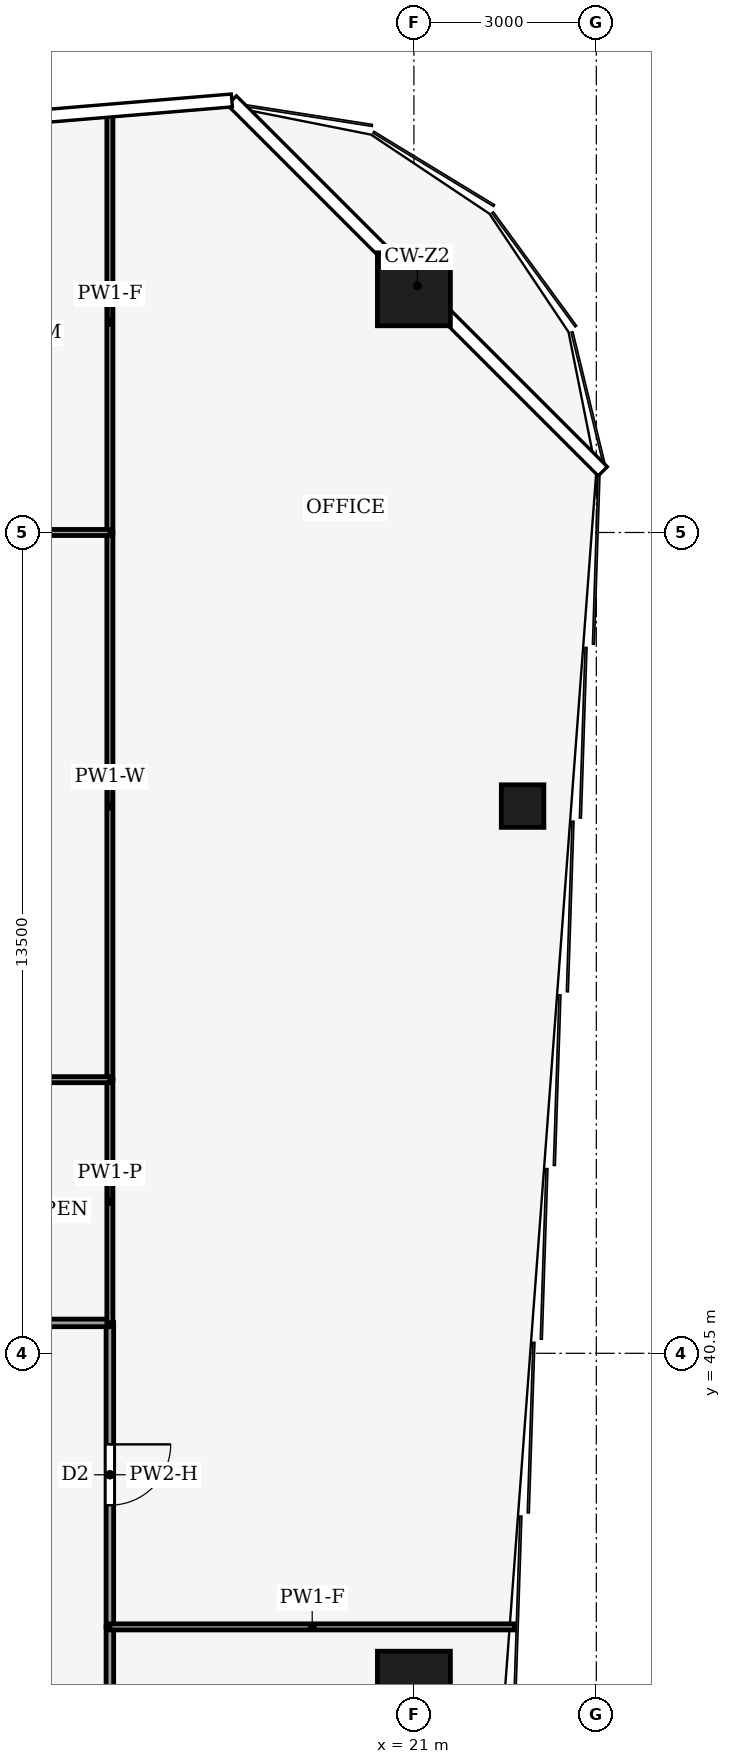
"""IFC4 building model, lengths in metres.
Left out: names, types, materials, properties, quantities, classifications, styles, units other than length and angle.
Written with IfcOpenShell. Run it as: python <this file> out.ifc"""

import sys

from ifc_helpers import new_model, si_unit, direction, frame, frame_2d, origin, origin_2d, place, context, subcontext, project, spatial, rectangle, hollow_rectangle, extrude, element, fill, save


model = new_model("IFC4")
c1 = context("Model", 3, precision=1e-05, world=origin(), true_north=direction((0.0, 1.0)))
c2 = subcontext(c1, "Body", "Model", "MODEL_VIEW")
j1 = project(units=[si_unit("LENGTHUNIT", "METRE"), si_unit("PLANEANGLEUNIT", "RADIAN")], contexts=[c1])
p1 = place(None, origin())
s1 = spatial("IfcSite", under=j1, at=p1, CompositionType="ELEMENT")
p2 = place(p1, origin())
s2 = spatial("IfcBuilding", under=s1, at=p2, CompositionType="ELEMENT")
p3 = place(p2, frame((0.0, 0.0, 134.0)))
s3 = spatial("IfcBuildingStorey", under=s2, at=p3, CompositionType="ELEMENT", Elevation=134.0)
for number, where, z_axis, x_axis in (
    (1, (21.0, 58.0, 0.0), (0.0, 0.0, 1.0), (1.0, 0.0, 0.0)),
    (2, (21.0, 35.0, 0.0), (0.0, 0.0, 1.0), (1.0, 0.0, 0.0)),
):
    element("IfcColumn", number, at=place(p3, frame(where, z_axis=z_axis, x_axis=x_axis)), inside=s3, PredefinedType="COLUMN", context=c2, shape_type="SweptSolid", body=[
        extrude(hollow_rectangle(XDim=1.2, YDim=1.2, WallThickness=0.07, at=origin_2d()), origin(), (0.0, 0.0, 1.0), 4.0),
    ])
p4 = place(p3, frame((22.788, 49.5, 0.0), z_axis=(0.0, 0.0, 1.0), x_axis=(1.0, 0.0, 0.0)))
e3 = element("IfcColumn", 3, at=p4, inside=s3, PredefinedType="COLUMN", context=c2, shape_type="SweptSolid", body=[
    extrude(hollow_rectangle(XDim=0.7, YDim=0.7, WallThickness=0.03, at=origin_2d()), origin(), (0.0, 0.0, 1.0), 4.0),
])
p5 = place(p3, frame((16.0, 36.0, 0.0), z_axis=(0.0, 0.0, 1.0), x_axis=(0.0, -1.0, 0.0)))
e4 = element("IfcWall", 4, at=p5, inside=s3, PredefinedType="PARTITIONING", context=c2, shape_type="SweptSolid", body=[
    extrude(rectangle(XDim=6.0, YDim=0.125, at=frame_2d((3.0, 0.0))), origin(), (0.0, 0.0, 1.0), 3.48),
])
p6 = place(p5, frame((2.5, 0.0, 0.0)))
e5 = element("IfcOpeningElement", 5, at=p6, cuts=e4, PredefinedType="OPENING", context=c2, shape_type="SweptSolid", body=[
    extrude(rectangle(XDim=1.0, YDim=2.1, at=frame_2d((0.5, 1.05))), frame((0.0, 0.073, 0.0), z_axis=(0.0, -1.0, 0.0), x_axis=(1.0, 0.0, 0.0)), (0.0, 0.0, 1.0), 0.145),
])
p7 = place(p3, frame((16.0, 41.004, 0.0), z_axis=(0.0, 0.0, 1.0), x_axis=(0.0, -1.0, 0.0)))
e6 = element("IfcWall", 6, at=p7, inside=s3, PredefinedType="PARTITIONING", context=c2, shape_type="SweptSolid", body=[
    extrude(rectangle(XDim=5.004, YDim=0.125, at=frame_2d((2.502, 0.0))), origin(), (0.0, 0.0, 1.0), 3.14),
])
p8 = place(p7, frame((2.002, 0.0, 0.0)))
e7 = element("IfcOpeningElement", 7, at=p8, cuts=e6, PredefinedType="OPENING", context=c2, shape_type="SweptSolid", body=[
    extrude(rectangle(XDim=1.0, YDim=2.1, at=frame_2d((0.5, 1.05))), frame((0.0, 0.073, 0.0), z_axis=(0.0, -1.0, 0.0), x_axis=(1.0, 0.0, 0.0)), (0.0, 0.0, 1.0), 0.145),
])
p9 = place(p3, frame((12.0, 41.0, 0.0), z_axis=(0.0, 0.0, 1.0), x_axis=(1.0, 0.0, 0.0)))
e8 = element("IfcWall", 8, at=p9, inside=s3, PredefinedType="PARTITIONING", context=c2, shape_type="SweptSolid", body=[
    extrude(rectangle(XDim=4.0, YDim=0.125, at=frame_2d((2.0, 0.0))), origin(), (0.0, 0.0, 1.0), 3.44),
])
p10 = place(p9, frame((1.5, 0.0, 0.0)))
e9 = element("IfcOpeningElement", 9, at=p10, cuts=e8, PredefinedType="OPENING", context=c2, shape_type="SweptSolid", body=[
    extrude(rectangle(XDim=1.0, YDim=2.1, at=frame_2d((0.5, 1.05))), frame((0.0, 0.073, 0.0), z_axis=(0.0, -1.0, 0.0), x_axis=(1.0, 0.0, 0.0)), (0.0, 0.0, 1.0), 0.145),
])
p11 = place(p3, frame((22.655, 36.0, 0.0), z_axis=(0.0, 0.0, 1.0), x_axis=(-1.0, 0.0, 0.0)))
e10 = element("IfcWall", 10, at=p11, inside=s3, PredefinedType="PARTITIONING", context=c2, shape_type="SweptSolid", body=[
    extrude(rectangle(XDim=6.655, YDim=0.1, at=frame_2d((3.328, 0.0))), origin(), (0.0, 0.0, 1.0), 3.04),
])
p12 = place(p3, frame((16.0, 45.0, 0.0), z_axis=(0.0, 0.0, 1.0), x_axis=(0.0, -1.0, 0.0)))
e11 = element("IfcWall", 11, at=p12, inside=s3, PredefinedType="PARTITIONING", context=c2, shape_type="SweptSolid", body=[
    extrude(rectangle(XDim=4.0, YDim=0.1, at=frame_2d((2.0, 0.0))), origin(), (0.0, 0.0, 1.0), 3.44),
])
p13 = place(p3, frame((16.0, 54.0, 0.0), z_axis=(0.0, 0.0, 1.0), x_axis=(0.0, -1.0, 0.0)))
e12 = element("IfcWall", 12, at=p13, inside=s3, PredefinedType="PARTITIONING", context=c2, shape_type="SweptSolid", body=[
    extrude(rectangle(XDim=9.0, YDim=0.1, at=frame_2d((4.5, 0.0))), origin(), (0.0, 0.0, 1.0), 3.24),
])
p14 = place(p3, frame((16.0, 60.913, 0.0), z_axis=(0.0, 0.0, 1.0), x_axis=(0.0, -1.0, 0.0)))
e13 = element("IfcWall", 13, at=p14, inside=s3, PredefinedType="PARTITIONING", context=c2, shape_type="SweptSolid", body=[
    extrude(rectangle(XDim=6.913, YDim=0.1, at=frame_2d((3.457, 0.0))), origin(), (0.0, 0.0, 1.0), 3.04),
])
p15 = place(p3, frame((16.0, 45.0, 0.0), z_axis=(0.0, 0.0, 1.0), x_axis=(-1.0, 0.0, 0.0)))
e14 = element("IfcWall", 14, at=p15, inside=s3, PredefinedType="PARTITIONING", context=c2, shape_type="SweptSolid", body=[
    extrude(rectangle(XDim=4.004, YDim=0.1, at=frame_2d((2.002, 0.0))), origin(), (0.0, 0.0, 1.0), 3.87),
])
p16 = place(p3, frame((3.0, 54.0, 0.0), z_axis=(0.0, 0.0, 1.0), x_axis=(1.0, 0.0, 0.0)))
e15 = element("IfcWall", 15, at=p16, inside=s3, PredefinedType="PARTITIONING", context=c2, shape_type="SweptSolid", body=[
    extrude(rectangle(XDim=13.0, YDim=0.1, at=frame_2d((6.5, 0.0))), origin(), (0.0, 0.0, 1.0), 3.44),
])
p17 = place(p16, frame((6.0, 0.0, 0.0)))
e16 = element("IfcOpeningElement", 16, at=p17, cuts=e15, PredefinedType="OPENING", context=c2, shape_type="SweptSolid", body=[
    extrude(rectangle(XDim=1.0, YDim=2.1, at=frame_2d((0.5, 1.05))), frame((0.0, 0.06, 0.0), z_axis=(0.0, -1.0, 0.0), x_axis=(1.0, 0.0, 0.0)), (0.0, 0.0, 1.0), 0.12),
])
p18 = place(p8, origin())
e17 = element("IfcDoor", 17, at=p18, inside=s3, OperationType="SINGLE_SWING_LEFT", PredefinedType="DOOR", context=c2, shape_type="SweptSolid", body=[
    extrude(rectangle(XDim=1.0, YDim=2.1, at=frame_2d((0.5, 1.05))), frame((0.0, 0.025, 0.0), z_axis=(0.0, -1.0, 0.0), x_axis=(1.0, 0.0, 0.0)), (0.0, 0.0, 1.0), 0.05),
])
fill(e7, e17)
save(model, sys.argv[1])
